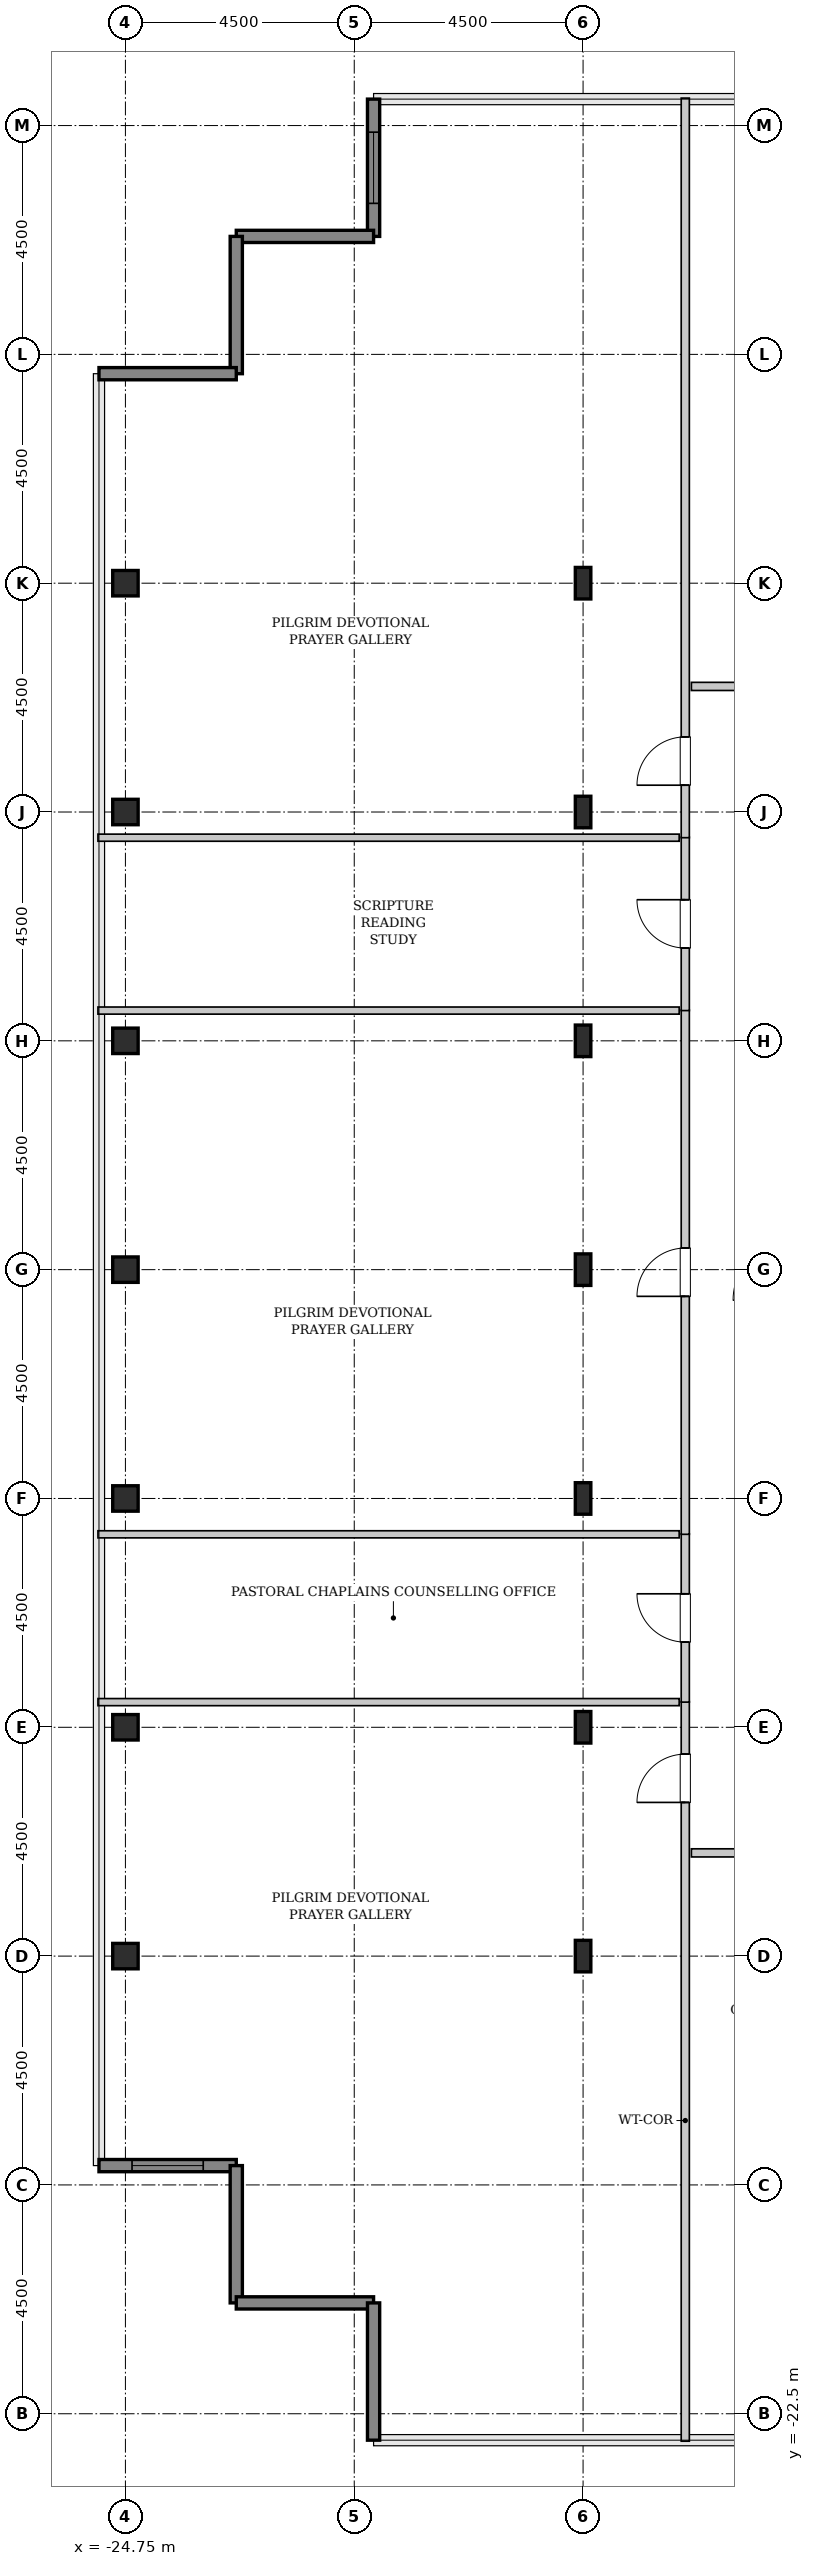
"""IFC4 building model, lengths in metres.
Left out: names, types, materials, properties, quantities, classifications, styles, units other than length and angle.
Written with IfcOpenShell. Run it as: python <this file> out.ifc"""

import sys

from ifc_helpers import new_model, si_unit, direction, frame, frame_2d, origin, origin_2d, place, context, subcontext, project, spatial, rectangle, hollow_rectangle, i_section, extrude, source, transform, mapped, element, fill, save


model = new_model("IFC4")
c1 = context("Model", 3, precision=1e-05, world=origin(), true_north=direction((0.0, 1.0)))
c2 = subcontext(c1, "Body", "Model", "MODEL_VIEW")
j1 = project(units=[si_unit("LENGTHUNIT", "METRE"), si_unit("PLANEANGLEUNIT", "RADIAN")], contexts=[c1])
p1 = place(None, origin())
s1 = spatial("IfcSite", under=j1, at=p1, CompositionType="ELEMENT")
p2 = place(p1, origin())
s2 = spatial("IfcBuilding", under=s1, at=p2, CompositionType="ELEMENT")
p3 = place(p2, frame((0.0, 0.0, 341.4)))
s3 = spatial("IfcBuildingStorey", under=s2, at=p3, CompositionType="ELEMENT", Elevation=341.4)
m1 = source(origin(), c2, "Body", "SweptSolid", [
    extrude(hollow_rectangle(XDim=0.5, YDim=0.5, WallThickness=0.025, InnerFilletRadius=0.025, OuterFilletRadius=0.05, at=origin_2d()), origin(), (0.0, 0.0, 1.0), 3.8),
])
for number, where, z_axis, x_axis in (
    (1, (-24.75, -13.5, 0.0), (0.0, 0.0, 1.0), (1.0, 0.0, 0.0)),
    (2, (-24.75, -9.0, 0.0), (0.0, 0.0, 1.0), (1.0, 0.0, 0.0)),
    (3, (-24.75, -4.5, 0.0), (0.0, 0.0, 1.0), (1.0, 0.0, 0.0)),
    (4, (-24.75, 0.0, 0.0), (0.0, 0.0, 1.0), (1.0, 0.0, 0.0)),
    (5, (-24.75, 4.5, 0.0), (0.0, 0.0, 1.0), (1.0, 0.0, 0.0)),
    (6, (-24.75, 9.0, 0.0), (0.0, 0.0, 1.0), (1.0, 0.0, 0.0)),
    (7, (-24.75, 13.5, 0.0), (0.0, 0.0, 1.0), (1.0, 0.0, 0.0)),
):
    element("IfcColumn", number, at=place(p3, frame(where, z_axis=z_axis, x_axis=x_axis)), inside=s3, PredefinedType="COLUMN", context=c2, shape_type="MappedRepresentation", body=[
        mapped(m1, transform((0.0, 0.0, 0.0), x_axis=(1.0, 0.0, 0.0), y_axis=(0.0, 1.0, 0.0), z_axis=(0.0, 0.0, 1.0), scale=1.0)),
    ])
m2 = source(origin(), c2, "Body", "SweptSolid", [
    extrude(i_section(OverallWidth=0.305, OverallDepth=0.62, WebThickness=0.021, FlangeThickness=0.04, FilletRadius=0.027, at=origin_2d()), origin(), (0.0, 0.0, 1.0), 3.8),
])
for number, where, z_axis, x_axis in (
    (8, (-15.75, -13.5, 0.0), (0.0, 0.0, 1.0), (1.0, 0.0, 0.0)),
    (9, (-15.75, -9.0, 0.0), (0.0, 0.0, 1.0), (1.0, 0.0, 0.0)),
    (10, (-15.75, -4.5, 0.0), (0.0, 0.0, 1.0), (1.0, 0.0, 0.0)),
    (11, (-15.75, 0.0, 0.0), (0.0, 0.0, 1.0), (1.0, 0.0, 0.0)),
    (12, (-15.75, 4.5, 0.0), (0.0, 0.0, 1.0), (1.0, 0.0, 0.0)),
    (13, (-15.75, 9.0, 0.0), (0.0, 0.0, 1.0), (1.0, 0.0, 0.0)),
    (14, (-15.75, 13.5, 0.0), (0.0, 0.0, 1.0), (1.0, 0.0, 0.0)),
):
    element("IfcColumn", number, at=place(p3, frame(where, z_axis=z_axis, x_axis=x_axis)), inside=s3, PredefinedType="COLUMN", context=c2, shape_type="MappedRepresentation", body=[
        mapped(m2, transform((0.0, 0.0, 0.0), x_axis=(1.0, 0.0, 0.0), y_axis=(0.0, 1.0, 0.0), z_axis=(0.0, 0.0, 1.0), scale=1.0)),
    ])
m3 = source(origin(), c2, "Body", "SweptSolid", [
    extrude(rectangle(XDim=2.7, YDim=0.24, at=frame_2d((1.35, 0.0))), origin(), (0.0, 0.0, 1.0), 3.55),
])
p4 = place(p3, frame((-19.87, 23.02, 0.0), z_axis=(0.0, 0.0, 1.0), x_axis=(0.0, -1.0, 0.0)))
e15 = element("IfcWall", 15, at=p4, inside=s3, PredefinedType="SHEAR", context=c2, shape_type="MappedRepresentation", body=[
    mapped(m3, transform((0.0, 0.0, 0.0), x_axis=(1.0, 0.0, 0.0), y_axis=(0.0, 1.0, 0.0), z_axis=(0.0, 0.0, 1.0), scale=1.0)),
])
p5 = place(p4, frame((0.65, 0.0, 0.85)))
e16 = element("IfcOpeningElement", 16, at=p5, cuts=e15, PredefinedType="OPENING", context=c2, shape_type="SweptSolid", body=[
    extrude(rectangle(XDim=1.4, YDim=1.8, at=frame_2d((0.7, 0.9))), frame((0.0, 0.13, 0.0), z_axis=(0.0, -1.0, 0.0), x_axis=(1.0, 0.0, 0.0)), (0.0, 0.0, 1.0), 0.26),
])
for number, where, z_axis, x_axis in (
    (17, (-19.87, 20.32, 0.0), (0.0, 0.0, 1.0), (-1.0, 0.0, 0.0)),
    (18, (-22.57, 20.32, 0.0), (0.0, 0.0, 1.0), (0.0, -1.0, 0.0)),
    (19, (-22.57, 17.62, 0.0), (0.0, 0.0, 1.0), (-1.0, 0.0, 0.0)),
):
    element("IfcWall", number, at=place(p3, frame(where, z_axis=z_axis, x_axis=x_axis)), inside=s3, PredefinedType="SHEAR", context=c2, shape_type="MappedRepresentation", body=[
        mapped(m3, transform((0.0, 0.0, 0.0), x_axis=(1.0, 0.0, 0.0), y_axis=(0.0, 1.0, 0.0), z_axis=(0.0, 0.0, 1.0), scale=1.0)),
    ])
p6 = place(p3, frame((-25.27, -17.62, 0.0), z_axis=(0.0, 0.0, 1.0), x_axis=(1.0, 0.0, 0.0)))
e20 = element("IfcWall", 20, at=p6, inside=s3, PredefinedType="SHEAR", context=c2, shape_type="MappedRepresentation", body=[
    mapped(m3, transform((0.0, 0.0, 0.0), x_axis=(1.0, 0.0, 0.0), y_axis=(0.0, 1.0, 0.0), z_axis=(0.0, 0.0, 1.0), scale=1.0)),
])
p7 = place(p6, frame((0.65, 0.0, 0.85)))
e21 = element("IfcOpeningElement", 21, at=p7, cuts=e20, PredefinedType="OPENING", context=c2, shape_type="SweptSolid", body=[
    extrude(rectangle(XDim=1.4, YDim=1.8, at=frame_2d((0.7, 0.9))), frame((0.0, 0.13, 0.0), z_axis=(0.0, -1.0, 0.0), x_axis=(1.0, 0.0, 0.0)), (0.0, 0.0, 1.0), 0.26),
])
for number, where, z_axis, x_axis in (
    (22, (-22.57, -17.62, 0.0), (0.0, 0.0, 1.0), (0.0, -1.0, 0.0)),
    (23, (-22.57, -20.32, 0.0), (0.0, 0.0, 1.0), (1.0, 0.0, 0.0)),
    (24, (-19.87, -20.32, 0.0), (0.0, 0.0, 1.0), (0.0, -1.0, 0.0)),
):
    element("IfcWall", number, at=place(p3, frame(where, z_axis=z_axis, x_axis=x_axis)), inside=s3, PredefinedType="SHEAR", context=c2, shape_type="MappedRepresentation", body=[
        mapped(m3, transform((0.0, 0.0, 0.0), x_axis=(1.0, 0.0, 0.0), y_axis=(0.0, 1.0, 0.0), z_axis=(0.0, 0.0, 1.0), scale=1.0)),
    ])
m4 = source(origin(), c2, "Body", "SweptSolid", [
    extrude(rectangle(XDim=14.545, YDim=0.16, at=frame_2d((7.272, 0.0))), origin(), (0.0, 0.0, 1.0), 3.535),
])
p8 = place(p3, frame((-13.74, -23.04, 0.0), z_axis=(0.0, 0.0, 1.0), x_axis=(0.0, 1.0, 0.0)))
e25 = element("IfcWall", 25, at=p8, inside=s3, PredefinedType="PARTITIONING", context=c2, shape_type="MappedRepresentation", body=[
    mapped(m4, transform((0.0, 0.0, 0.0), x_axis=(1.0, 0.0, 0.0), y_axis=(0.0, 1.0, 0.0), z_axis=(0.0, 0.0, 1.0), scale=1.0)),
])
p9 = place(p8, frame((12.562, 0.0, 0.0)))
e26 = element("IfcOpeningElement", 26, at=p9, cuts=e25, PredefinedType="OPENING", context=c2, shape_type="SweptSolid", body=[
    extrude(rectangle(XDim=0.95, YDim=2.1, at=frame_2d((0.475, 1.05))), frame((0.0, 0.09, 0.0), z_axis=(0.0, -1.0, 0.0), x_axis=(1.0, 0.0, 0.0)), (0.0, 0.0, 1.0), 0.18),
])
m5 = source(origin(), c2, "Body", "SweptSolid", [
    extrude(rectangle(XDim=11.43, YDim=0.14, at=frame_2d((5.715, 0.0))), origin(), (0.0, 0.0, 1.0), 2.975),
])
p10 = place(p3, frame((-25.29, -8.505, 0.0), z_axis=(0.0, 0.0, 1.0), x_axis=(1.0, 0.0, 0.0)))
e27 = element("IfcWall", 27, at=p10, inside=s3, PredefinedType="PARTITIONING", context=c2, shape_type="MappedRepresentation", body=[
    mapped(m5, transform((0.0, 0.0, 0.0), x_axis=(1.0, 0.0, 0.0), y_axis=(0.0, 1.0, 0.0), z_axis=(0.0, 0.0, 1.0), scale=1.0)),
])
m6 = source(origin(), c2, "Body", "SweptSolid", [
    extrude(rectangle(XDim=3.31, YDim=0.16, at=frame_2d((1.655, 0.0))), origin(), (0.0, 0.0, 1.0), 3.535),
])
p11 = place(p3, frame((-13.74, -8.505, 0.0), z_axis=(0.0, 0.0, 1.0), x_axis=(0.0, 1.0, 0.0)))
e28 = element("IfcWall", 28, at=p11, inside=s3, PredefinedType="PARTITIONING", context=c2, shape_type="MappedRepresentation", body=[
    mapped(m6, transform((0.0, 0.0, 0.0), x_axis=(1.0, 0.0, 0.0), y_axis=(0.0, 1.0, 0.0), z_axis=(0.0, 0.0, 1.0), scale=1.0)),
])
p12 = place(p11, frame((1.18, 0.0, 0.0)))
e29 = element("IfcOpeningElement", 29, at=p12, cuts=e28, PredefinedType="OPENING", context=c2, shape_type="SweptSolid", body=[
    extrude(rectangle(XDim=0.95, YDim=2.1, at=frame_2d((0.475, 1.05))), frame((0.0, 0.09, 0.0), z_axis=(0.0, -1.0, 0.0), x_axis=(1.0, 0.0, 0.0)), (0.0, 0.0, 1.0), 0.18),
])
m7 = source(origin(), c2, "Body", "SweptSolid", [
    extrude(rectangle(XDim=11.43, YDim=0.14, at=frame_2d((5.715, 0.0))), origin(), (0.0, 0.0, 1.0), 3.535),
])
p13 = place(p3, frame((-25.29, -5.205, 0.0), z_axis=(0.0, 0.0, 1.0), x_axis=(1.0, 0.0, 0.0)))
e30 = element("IfcWall", 30, at=p13, inside=s3, PredefinedType="PARTITIONING", context=c2, shape_type="MappedRepresentation", body=[
    mapped(m7, transform((0.0, 0.0, 0.0), x_axis=(1.0, 0.0, 0.0), y_axis=(0.0, 1.0, 0.0), z_axis=(0.0, 0.0, 1.0), scale=1.0)),
])
m8 = source(origin(), c2, "Body", "SweptSolid", [
    extrude(rectangle(XDim=10.31, YDim=0.16, at=frame_2d((5.155, 0.0))), origin(), (0.0, 0.0, 1.0), 3.535),
])
p14 = place(p3, frame((-13.74, -5.205, 0.0), z_axis=(0.0, 0.0, 1.0), x_axis=(0.0, 1.0, 0.0)))
e31 = element("IfcWall", 31, at=p14, inside=s3, PredefinedType="PARTITIONING", context=c2, shape_type="MappedRepresentation", body=[
    mapped(m8, transform((0.0, 0.0, 0.0), x_axis=(1.0, 0.0, 0.0), y_axis=(0.0, 1.0, 0.0), z_axis=(0.0, 0.0, 1.0), scale=1.0)),
])
p15 = place(p14, frame((4.68, 0.0, 0.0)))
e32 = element("IfcOpeningElement", 32, at=p15, cuts=e31, PredefinedType="OPENING", context=c2, shape_type="SweptSolid", body=[
    extrude(rectangle(XDim=0.95, YDim=2.1, at=frame_2d((0.475, 1.05))), frame((0.0, 0.09, 0.0), z_axis=(0.0, -1.0, 0.0), x_axis=(1.0, 0.0, 0.0)), (0.0, 0.0, 1.0), 0.18),
])
p16 = place(p3, frame((-25.29, 5.095, 0.0), z_axis=(0.0, 0.0, 1.0), x_axis=(1.0, 0.0, 0.0)))
e33 = element("IfcWall", 33, at=p16, inside=s3, PredefinedType="PARTITIONING", context=c2, shape_type="MappedRepresentation", body=[
    mapped(m7, transform((0.0, 0.0, 0.0), x_axis=(1.0, 0.0, 0.0), y_axis=(0.0, 1.0, 0.0), z_axis=(0.0, 0.0, 1.0), scale=1.0)),
])
m9 = source(origin(), c2, "Body", "SweptSolid", [
    extrude(rectangle(XDim=3.41, YDim=0.16, at=frame_2d((1.705, 0.0))), origin(), (0.0, 0.0, 1.0), 3.535),
])
p17 = place(p3, frame((-13.74, 5.095, 0.0), z_axis=(0.0, 0.0, 1.0), x_axis=(0.0, 1.0, 0.0)))
e34 = element("IfcWall", 34, at=p17, inside=s3, PredefinedType="PARTITIONING", context=c2, shape_type="MappedRepresentation", body=[
    mapped(m9, transform((0.0, 0.0, 0.0), x_axis=(1.0, 0.0, 0.0), y_axis=(0.0, 1.0, 0.0), z_axis=(0.0, 0.0, 1.0), scale=1.0)),
])
p18 = place(p17, frame((1.23, 0.0, 0.0)))
e35 = element("IfcOpeningElement", 35, at=p18, cuts=e34, PredefinedType="OPENING", context=c2, shape_type="SweptSolid", body=[
    extrude(rectangle(XDim=0.95, YDim=2.1, at=frame_2d((0.475, 1.05))), frame((0.0, 0.09, 0.0), z_axis=(0.0, -1.0, 0.0), x_axis=(1.0, 0.0, 0.0)), (0.0, 0.0, 1.0), 0.18),
])
p19 = place(p3, frame((-25.29, 8.495, 0.0), z_axis=(0.0, 0.0, 1.0), x_axis=(1.0, 0.0, 0.0)))
e36 = element("IfcWall", 36, at=p19, inside=s3, PredefinedType="PARTITIONING", context=c2, shape_type="MappedRepresentation", body=[
    mapped(m5, transform((0.0, 0.0, 0.0), x_axis=(1.0, 0.0, 0.0), y_axis=(0.0, 1.0, 0.0), z_axis=(0.0, 0.0, 1.0), scale=1.0)),
])
p20 = place(p3, frame((-13.74, 8.495, 0.0), z_axis=(0.0, 0.0, 1.0), x_axis=(0.0, 1.0, 0.0)))
e37 = element("IfcWall", 37, at=p20, inside=s3, PredefinedType="PARTITIONING", context=c2, shape_type="MappedRepresentation", body=[
    mapped(m4, transform((0.0, 0.0, 0.0), x_axis=(1.0, 0.0, 0.0), y_axis=(0.0, 1.0, 0.0), z_axis=(0.0, 0.0, 1.0), scale=1.0)),
])
p21 = place(p20, frame((1.032, 0.0, 0.0)))
e38 = element("IfcOpeningElement", 38, at=p21, cuts=e37, PredefinedType="OPENING", context=c2, shape_type="SweptSolid", body=[
    extrude(rectangle(XDim=0.95, YDim=2.1, at=frame_2d((0.475, 1.05))), frame((0.0, 0.09, 0.0), z_axis=(0.0, -1.0, 0.0), x_axis=(1.0, 0.0, 0.0)), (0.0, 0.0, 1.0), 0.18),
])
m10 = source(origin(), c2, "Body", "SweptSolid", [
    extrude(rectangle(XDim=4.125, YDim=0.16, at=frame_2d((2.062, 0.0))), origin(), (0.0, 0.0, 1.0), 3.535),
])
p22 = place(p3, frame((-13.62, 11.47, 0.0), z_axis=(0.0, 0.0, 1.0), x_axis=(1.0, 0.0, 0.0)))
e39 = element("IfcWall", 39, at=p22, inside=s3, PredefinedType="PARTITIONING", context=c2, shape_type="MappedRepresentation", body=[
    mapped(m10, transform((0.0, 0.0, 0.0), x_axis=(1.0, 0.0, 0.0), y_axis=(0.0, 1.0, 0.0), z_axis=(0.0, 0.0, 1.0), scale=1.0)),
])
p23 = place(p22, frame((1.587, 0.0, 0.0)))
e40 = element("IfcOpeningElement", 40, at=p23, cuts=e39, PredefinedType="OPENING", context=c2, shape_type="SweptSolid", body=[
    extrude(rectangle(XDim=0.95, YDim=2.1, at=frame_2d((0.475, 1.05))), frame((0.0, 0.09, 0.0), z_axis=(0.0, -1.0, 0.0), x_axis=(1.0, 0.0, 0.0)), (0.0, 0.0, 1.0), 0.18),
])
m11 = source(origin(), c2, "Body", "SweptSolid", [
    extrude(rectangle(XDim=4.025, YDim=0.16, at=frame_2d((2.013, 0.0))), origin(), (0.0, 0.0, 1.0), 3.535),
])
p24 = place(p3, frame((-13.62, -11.47, 0.0), z_axis=(0.0, 0.0, 1.0), x_axis=(1.0, 0.0, 0.0)))
e41 = element("IfcWall", 41, at=p24, inside=s3, PredefinedType="PARTITIONING", context=c2, shape_type="MappedRepresentation", body=[
    mapped(m11, transform((0.0, 0.0, 0.0), x_axis=(1.0, 0.0, 0.0), y_axis=(0.0, 1.0, 0.0), z_axis=(0.0, 0.0, 1.0), scale=1.0)),
])
p25 = place(p24, frame((1.538, 0.0, 0.0)))
e42 = element("IfcOpeningElement", 42, at=p25, cuts=e41, PredefinedType="OPENING", context=c2, shape_type="SweptSolid", body=[
    extrude(rectangle(XDim=0.95, YDim=2.1, at=frame_2d((0.475, 1.05))), frame((0.0, 0.09, 0.0), z_axis=(0.0, -1.0, 0.0), x_axis=(1.0, 0.0, 0.0)), (0.0, 0.0, 1.0), 0.18),
])
m12 = source(origin(), c2, "Body", "SweptSolid", [
    extrude(rectangle(XDim=1.4, YDim=1.8, at=frame_2d((0.7, 0.9))), frame((0.0, 0.03, 0.0), z_axis=(0.0, -1.0, 0.0), x_axis=(1.0, 0.0, 0.0)), (0.0, 0.0, 1.0), 0.06),
])
p26 = place(p5, origin())
e43 = element("IfcWindow", 43, at=p26, inside=s3, PartitioningType="SINGLE_PANEL", PredefinedType="WINDOW", context=c2, shape_type="MappedRepresentation", body=[
    mapped(m12, transform((0.0, 0.0, 0.0), x_axis=(1.0, 0.0, 0.0), y_axis=(0.0, 1.0, 0.0), z_axis=(0.0, 0.0, 1.0), scale=1.0)),
])
fill(e16, e43)
p27 = place(p7, origin())
e44 = element("IfcWindow", 44, at=p27, inside=s3, PartitioningType="SINGLE_PANEL", PredefinedType="WINDOW", context=c2, shape_type="MappedRepresentation", body=[
    mapped(m12, transform((0.0, 0.0, 0.0), x_axis=(1.0, 0.0, 0.0), y_axis=(0.0, 1.0, 0.0), z_axis=(0.0, 0.0, 1.0), scale=1.0)),
])
fill(e21, e44)
m13 = source(origin(), c2, "Body", "SweptSolid", [
    extrude(rectangle(XDim=0.95, YDim=2.1, at=frame_2d((0.475, 1.05))), frame((0.0, 0.025, 0.0), z_axis=(0.0, -1.0, 0.0), x_axis=(1.0, 0.0, 0.0)), (0.0, 0.0, 1.0), 0.05),
])
p28 = place(p9, origin())
e45 = element("IfcDoor", 45, at=p28, inside=s3, OperationType="SINGLE_SWING_LEFT", PredefinedType="DOOR", context=c2, shape_type="MappedRepresentation", body=[
    mapped(m13, transform((0.0, 0.0, 0.0), x_axis=(1.0, 0.0, 0.0), y_axis=(0.0, 1.0, 0.0), z_axis=(0.0, 0.0, 1.0), scale=1.0)),
])
fill(e26, e45)
p29 = place(p12, origin())
e46 = element("IfcDoor", 46, at=p29, inside=s3, OperationType="SINGLE_SWING_RIGHT", PredefinedType="DOOR", context=c2, shape_type="MappedRepresentation", body=[
    mapped(m13, transform((0.0, 0.0, 0.0), x_axis=(1.0, 0.0, 0.0), y_axis=(0.0, 1.0, 0.0), z_axis=(0.0, 0.0, 1.0), scale=1.0)),
])
fill(e29, e46)
p30 = place(p15, origin())
e47 = element("IfcDoor", 47, at=p30, inside=s3, OperationType="SINGLE_SWING_LEFT", PredefinedType="DOOR", context=c2, shape_type="MappedRepresentation", body=[
    mapped(m13, transform((0.0, 0.0, 0.0), x_axis=(1.0, 0.0, 0.0), y_axis=(0.0, 1.0, 0.0), z_axis=(0.0, 0.0, 1.0), scale=1.0)),
])
fill(e32, e47)
p31 = place(p18, origin())
e48 = element("IfcDoor", 48, at=p31, inside=s3, OperationType="SINGLE_SWING_RIGHT", PredefinedType="DOOR", context=c2, shape_type="MappedRepresentation", body=[
    mapped(m13, transform((0.0, 0.0, 0.0), x_axis=(1.0, 0.0, 0.0), y_axis=(0.0, 1.0, 0.0), z_axis=(0.0, 0.0, 1.0), scale=1.0)),
])
fill(e35, e48)
p32 = place(p21, origin())
e49 = element("IfcDoor", 49, at=p32, inside=s3, OperationType="SINGLE_SWING_LEFT", PredefinedType="DOOR", context=c2, shape_type="MappedRepresentation", body=[
    mapped(m13, transform((0.0, 0.0, 0.0), x_axis=(1.0, 0.0, 0.0), y_axis=(0.0, 1.0, 0.0), z_axis=(0.0, 0.0, 1.0), scale=1.0)),
])
fill(e38, e49)
save(model, sys.argv[1])
